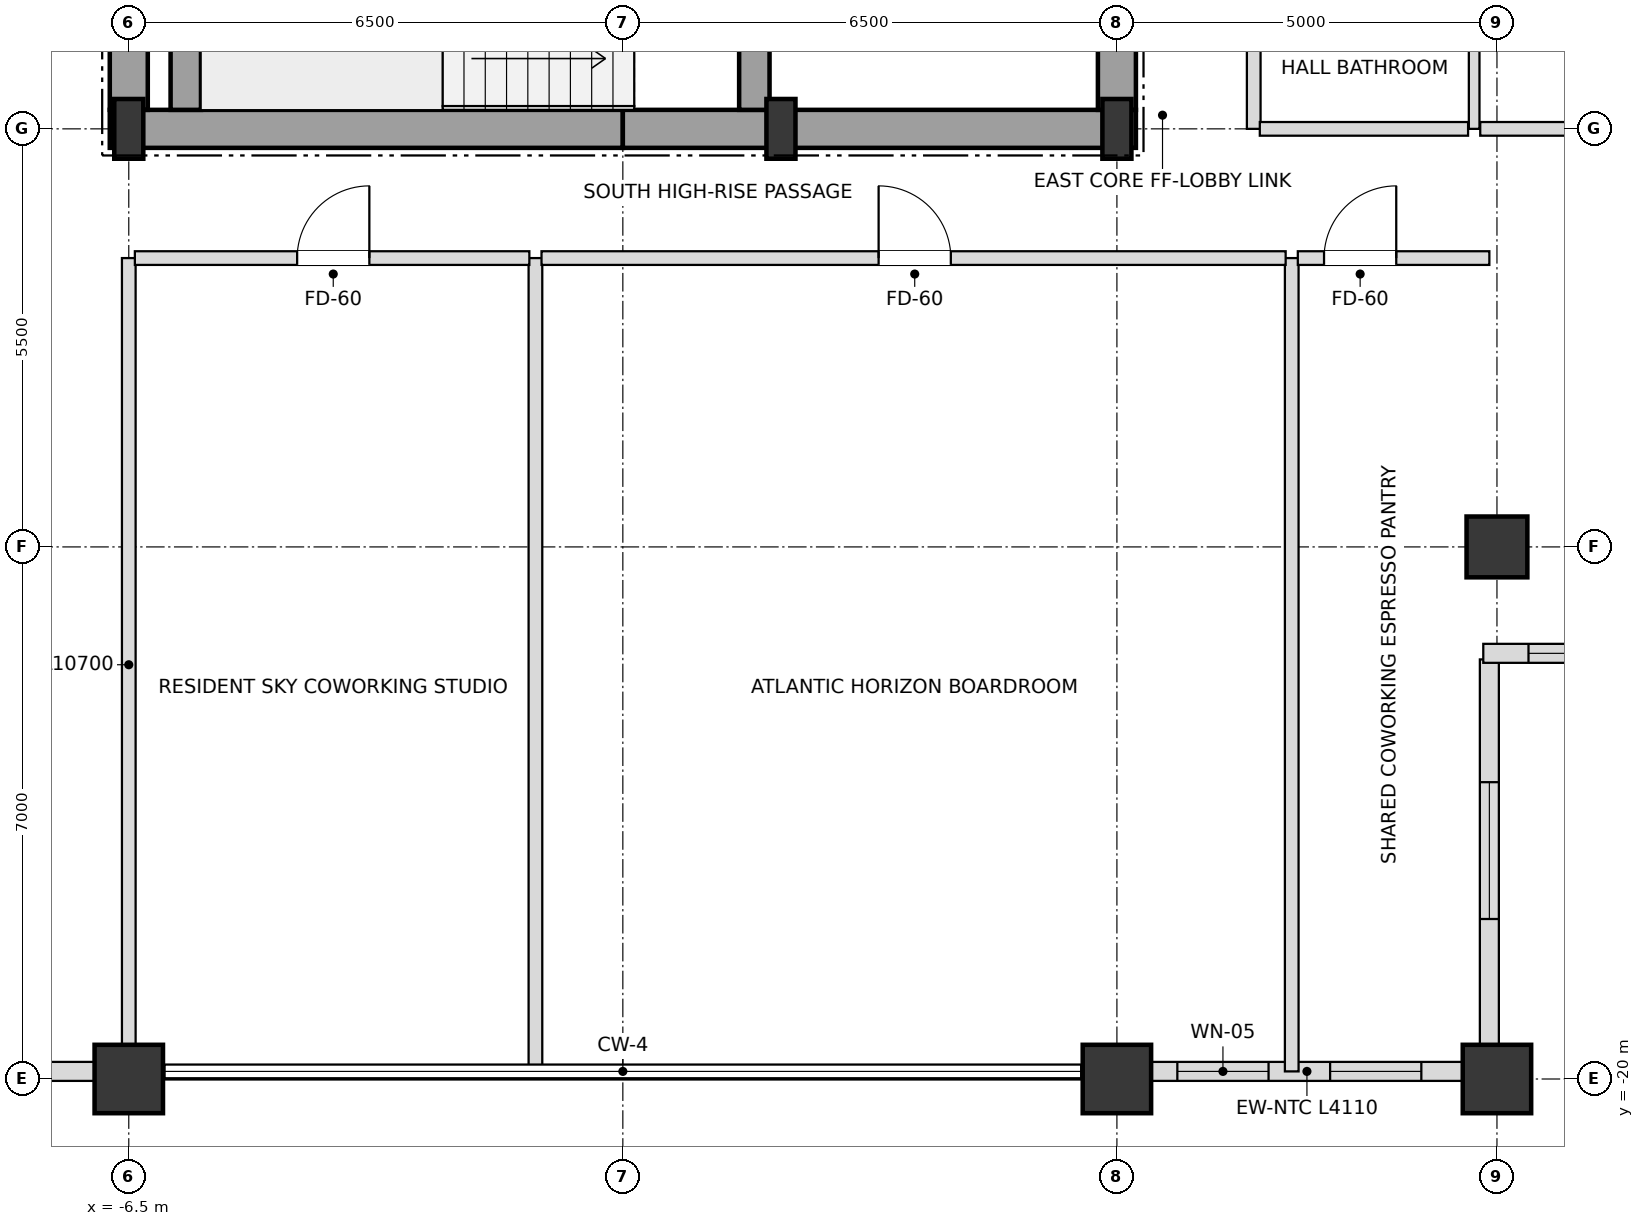
"""IFC4 building model, lengths in metres.
Left out: names, types, materials, properties, quantities, classifications, styles, units other than length and angle.
Written with IfcOpenShell. Run it as: python <this file> out.ifc"""

import sys

from ifc_helpers import new_model, si_unit, direction, frame, frame_2d, origin, origin_2d, place, context, subcontext, project, spatial, rectangle, i_section, extrude, element, fill, save


model = new_model("IFC4")
c1 = context("Model", 3, precision=1e-05, world=origin(), true_north=direction((0.0, 1.0)))
c2 = subcontext(c1, "Body", "Model", "MODEL_VIEW")
j1 = project(units=[si_unit("LENGTHUNIT", "METRE"), si_unit("PLANEANGLEUNIT", "RADIAN")], contexts=[c1])
p1 = place(None, origin())
s1 = spatial("IfcSite", under=j1, at=p1, CompositionType="ELEMENT")
p2 = place(p1, origin())
s2 = spatial("IfcBuilding", under=s1, at=p2, CompositionType="ELEMENT")
p3 = place(p2, frame((0.0, 0.0, 247.5)))
s3 = spatial("IfcBuildingStorey", under=s2, at=p3, CompositionType="ELEMENT", Elevation=247.5)
for number, where, z_axis, x_axis in (
    (1, (-6.5, -7.5, 0.0), (0.0, 0.0, 1.0), (1.0, 0.0, 0.0)),
    (2, (2.08, -7.5, 0.0), (0.0, 0.0, 1.0), (1.0, 0.0, 0.0)),
    (3, (6.5, -7.5, 0.0), (0.0, 0.0, 1.0), (1.0, 0.0, 0.0)),
):
    element("IfcColumn", number, at=place(p3, frame(where, z_axis=z_axis, x_axis=x_axis)), inside=s3, PredefinedType="COLUMN", context=c2, shape_type="SweptSolid", body=[
        extrude(i_section(OverallWidth=0.382, OverallDepth=0.786, WebThickness=0.02, FlangeThickness=0.033, at=origin_2d()), origin(), (0.0, 0.0, 1.0), 3.6),
    ])
for number, where, z_axis, x_axis in (
    (4, (-6.5, -20.0, 0.0), (0.0, 0.0, 1.0), (1.0, 0.0, 0.0)),
    (5, (6.5, -20.0, 0.0), (0.0, 0.0, 1.0), (1.0, 0.0, 0.0)),
    (6, (11.5, -20.0, 0.0), (0.0, 0.0, 1.0), (1.0, 0.0, 0.0)),
):
    element("IfcColumn", number, at=place(p3, frame(where, z_axis=z_axis, x_axis=x_axis)), inside=s3, PredefinedType="USERDEFINED", context=c2, shape_type="SweptSolid", body=[
        extrude(rectangle(XDim=0.9, YDim=0.9, at=origin_2d()), origin(), (0.0, 0.0, 1.0), 3.6),
    ])
p4 = place(p3, frame((11.5, -13.0, 0.0), z_axis=(0.0, 0.0, 1.0), x_axis=(1.0, 0.0, 0.0)))
e7 = element("IfcColumn", 7, at=p4, inside=s3, PredefinedType="COLUMN", context=c2, shape_type="SweptSolid", body=[
    extrude(rectangle(XDim=0.8, YDim=0.8, at=origin_2d()), origin(), (0.0, 0.0, 1.0), 3.6),
])
p5 = place(p3, frame((-11.055, -19.9, 0.0), z_axis=(0.0, 0.0, 1.0), x_axis=(1.0, 0.0, 0.0)))
e8 = element("IfcWall", 8, at=p5, inside=s3, PredefinedType="SOLIDWALL", context=c2, shape_type="SweptSolid", body=[
    extrude(rectangle(XDim=4.11, YDim=0.25, at=frame_2d((2.055, 0.0))), origin(), (0.0, 0.0, 1.0), 2.748),
])
p6 = place(p5, frame((1.155, 0.0, 0.72)))
e9 = element("IfcOpeningElement", 9, at=p6, cuts=e8, PredefinedType="OPENING", context=c2, shape_type="SweptSolid", body=[
    extrude(rectangle(XDim=1.8, YDim=1.68, at=frame_2d((0.9, 0.84))), frame((0.0, 0.135, 0.0), z_axis=(0.0, -1.0, 0.0), x_axis=(1.0, 0.0, 0.0)), (0.0, 0.0, 1.0), 0.27),
])
p7 = place(p3, frame((6.945, -19.9, 0.0), z_axis=(0.0, 0.0, 1.0), x_axis=(1.0, 0.0, 0.0)))
e10 = element("IfcWall", 10, at=p7, inside=s3, PredefinedType="SOLIDWALL", context=c2, shape_type="SweptSolid", body=[
    extrude(rectangle(XDim=4.11, YDim=0.25, at=frame_2d((2.055, 0.0))), origin(), (0.0, 0.0, 1.0), 2.748),
])
p8 = place(p7, frame((0.35, 0.0, 0.72)))
e11 = element("IfcOpeningElement", 11, at=p8, cuts=e10, PredefinedType="OPENING", context=c2, shape_type="SweptSolid", body=[
    extrude(rectangle(XDim=1.2, YDim=1.68, at=frame_2d((0.6, 0.84))), frame((0.0, 0.135, 0.0), z_axis=(0.0, -1.0, 0.0), x_axis=(1.0, 0.0, 0.0)), (0.0, 0.0, 1.0), 0.27),
])
p9 = place(p7, frame((2.36, 0.0, 0.72)))
e12 = element("IfcOpeningElement", 12, at=p9, cuts=e10, PredefinedType="OPENING", context=c2, shape_type="SweptSolid", body=[
    extrude(rectangle(XDim=1.2, YDim=1.68, at=frame_2d((0.6, 0.84))), frame((0.0, 0.135, 0.0), z_axis=(0.0, -1.0, 0.0), x_axis=(1.0, 0.0, 0.0)), (0.0, 0.0, 1.0), 0.27),
])
p10 = place(p3, frame((11.4, -19.82, 0.0), z_axis=(0.0, 0.0, 1.0), x_axis=(0.0, 1.0, 0.0)))
e13 = element("IfcWall", 13, at=p10, inside=s3, PredefinedType="SOLIDWALL", context=c2, shape_type="SweptSolid", body=[
    extrude(rectangle(XDim=5.34, YDim=0.25, at=frame_2d((2.67, 0.0))), origin(), (0.0, 0.0, 1.0), 2.748),
])
p11 = place(p10, frame((1.925, 0.0, 0.72)))
e14 = element("IfcOpeningElement", 14, at=p11, cuts=e13, PredefinedType="OPENING", context=c2, shape_type="SweptSolid", body=[
    extrude(rectangle(XDim=1.8, YDim=1.68, at=frame_2d((0.9, 0.84))), frame((0.0, 0.135, 0.0), z_axis=(0.0, -1.0, 0.0), x_axis=(1.0, 0.0, 0.0)), (0.0, 0.0, 1.0), 0.27),
])
p12 = place(p3, frame((11.32, -14.4, 0.0), z_axis=(0.0, 0.0, 1.0), x_axis=(1.0, 0.0, 0.0)))
e15 = element("IfcWall", 15, at=p12, inside=s3, PredefinedType="SOLIDWALL", context=c2, shape_type="SweptSolid", body=[
    extrude(rectangle(XDim=5.66, YDim=0.25, at=frame_2d((2.83, 0.0))), origin(), (0.0, 0.0, 1.0), 2.748),
])
p13 = place(p12, frame((0.595, 0.0, 0.72)))
e16 = element("IfcOpeningElement", 16, at=p13, cuts=e15, PredefinedType="OPENING", context=c2, shape_type="SweptSolid", body=[
    extrude(rectangle(XDim=1.8, YDim=1.68, at=frame_2d((0.9, 0.84))), frame((0.0, 0.135, 0.0), z_axis=(0.0, -1.0, 0.0), x_axis=(1.0, 0.0, 0.0)), (0.0, 0.0, 1.0), 0.27),
])
p14 = place(p12, frame((3.265, 0.0, 0.72)))
e17 = element("IfcOpeningElement", 17, at=p14, cuts=e15, PredefinedType="OPENING", context=c2, shape_type="SweptSolid", body=[
    extrude(rectangle(XDim=1.8, YDim=1.68, at=frame_2d((0.9, 0.84))), frame((0.0, 0.135, 0.0), z_axis=(0.0, -1.0, 0.0), x_axis=(1.0, 0.0, 0.0)), (0.0, 0.0, 1.0), 0.27),
])
for number, where, z_axis, x_axis in (
    (18, (-6.75, -7.5, 0.0), (0.0, 0.0, 1.0), (1.0, 0.0, 0.0)),
    (19, (0.0, -7.5, 0.0), (0.0, 0.0, 1.0), (1.0, 0.0, 0.0)),
):
    element("IfcWall", number, at=place(p3, frame(where, z_axis=z_axis, x_axis=x_axis)), inside=s3, PredefinedType="SHEAR", context=c2, shape_type="SweptSolid", body=[
        extrude(rectangle(XDim=6.75, YDim=0.5, at=frame_2d((3.375, 0.0))), origin(), (0.0, 0.0, 1.0), 3.38),
    ])
p15 = place(p3, frame((-6.5, -7.25, 0.0), z_axis=(0.0, 0.0, 1.0), x_axis=(0.0, 1.0, 0.0)))
e20 = element("IfcWall", 20, at=p15, inside=s3, PredefinedType="SHEAR", context=c2, shape_type="SweptSolid", body=[
    extrude(rectangle(XDim=3.55, YDim=0.5, at=frame_2d((1.775, 0.0))), origin(), (0.0, 0.0, 1.0), 3.38),
])
p16 = place(p3, frame((6.5, -7.25, 0.0), z_axis=(0.0, 0.0, 1.0), x_axis=(0.0, 1.0, 0.0)))
e21 = element("IfcWall", 21, at=p16, inside=s3, PredefinedType="SHEAR", context=c2, shape_type="SweptSolid", body=[
    extrude(rectangle(XDim=5.75, YDim=0.5, at=frame_2d((2.875, 0.0))), origin(), (0.0, 0.0, 1.0), 3.38),
])
p17 = place(p16, frame((0.85, 0.0, 0.0)))
e22 = element("IfcOpeningElement", 22, at=p17, cuts=e21, PredefinedType="OPENING", context=c2, shape_type="SweptSolid", body=[
    extrude(rectangle(XDim=1.05, YDim=2.15, at=frame_2d((0.525, 1.075))), frame((0.0, 0.26, 0.0), z_axis=(0.0, -1.0, 0.0), x_axis=(1.0, 0.0, 0.0)), (0.0, 0.0, 1.0), 0.52),
])
p18 = place(p3, frame((-5.75, -7.25, 0.0), z_axis=(0.0, 0.0, 1.0), x_axis=(0.0, 1.0, 0.0)))
e23 = element("IfcWall", 23, at=p18, inside=s3, PredefinedType="SHEAR", context=c2, shape_type="SweptSolid", body=[
    extrude(rectangle(XDim=2.9, YDim=0.4, at=frame_2d((1.45, 0.0))), origin(), (0.0, 0.0, 1.0), 3.38),
])
p19 = place(p3, frame((1.73, -7.25, 0.0), z_axis=(0.0, 0.0, 1.0), x_axis=(0.0, 1.0, 0.0)))
e24 = element("IfcWall", 24, at=p19, inside=s3, PredefinedType="SHEAR", context=c2, shape_type="SweptSolid", body=[
    extrude(rectangle(XDim=3.3, YDim=0.4, at=frame_2d((1.65, 0.0))), origin(), (0.0, 0.0, 1.0), 3.38),
])
p20 = place(p19, frame((0.9, 0.0, 0.0)))
e25 = element("IfcOpeningElement", 25, at=p20, cuts=e24, PredefinedType="OPENING", context=c2, shape_type="SweptSolid", body=[
    extrude(rectangle(XDim=1.05, YDim=2.15, at=frame_2d((0.525, 1.075))), frame((0.0, 0.21, 0.0), z_axis=(0.0, -1.0, 0.0), x_axis=(1.0, 0.0, 0.0)), (0.0, 0.0, 1.0), 0.42),
])
p21 = place(p3, frame((-6.5, -19.9, 0.0), z_axis=(0.0, 0.0, 1.0), x_axis=(0.0, 1.0, 0.0)))
e26 = element("IfcWall", 26, at=p21, inside=s3, PredefinedType="PARTITIONING", context=c2, shape_type="SweptSolid", body=[
    extrude(rectangle(XDim=10.7, YDim=0.18, at=frame_2d((5.35, 0.0))), origin(), (0.0, 0.0, 1.0), 2.826),
])
p22 = place(p3, frame((-1.15, -19.9, 0.0), z_axis=(0.0, 0.0, 1.0), x_axis=(0.0, 1.0, 0.0)))
e27 = element("IfcWall", 27, at=p22, inside=s3, PredefinedType="PARTITIONING", context=c2, shape_type="SweptSolid", body=[
    extrude(rectangle(XDim=10.7, YDim=0.18, at=frame_2d((5.35, 0.0))), origin(), (0.0, 0.0, 1.0), 3.018),
])
p23 = place(p3, frame((8.3, -7.5, 0.0), z_axis=(0.0, 0.0, 1.0), x_axis=(0.0, 1.0, 0.0)))
e28 = element("IfcWall", 28, at=p23, inside=s3, PredefinedType="PARTITIONING", context=c2, shape_type="SweptSolid", body=[
    extrude(rectangle(XDim=15.0, YDim=0.18, at=frame_2d((7.5, 0.0))), origin(), (0.0, 0.0, 1.0), 3.38),
])
p24 = place(p23, frame((2.355, 0.0, 0.0)))
e29 = element("IfcOpeningElement", 29, at=p24, cuts=e28, PredefinedType="OPENING", context=c2, shape_type="SweptSolid", body=[
    extrude(rectangle(XDim=0.95, YDim=2.15, at=frame_2d((0.475, 1.075))), frame((0.0, 0.1, 0.0), z_axis=(0.0, -1.0, 0.0), x_axis=(1.0, 0.0, 0.0)), (0.0, 0.0, 1.0), 0.2),
])
p25 = place(p3, frame((8.8, -19.9, 0.0), z_axis=(0.0, 0.0, 1.0), x_axis=(0.0, 1.0, 0.0)))
e30 = element("IfcWall", 30, at=p25, inside=s3, PredefinedType="PARTITIONING", context=c2, shape_type="SweptSolid", body=[
    extrude(rectangle(XDim=10.7, YDim=0.18, at=frame_2d((5.35, 0.0))), origin(), (0.0, 0.0, 1.0), 2.826),
])
p26 = place(p3, frame((11.2, -7.5, 0.0), z_axis=(0.0, 0.0, 1.0), x_axis=(0.0, 1.0, 0.0)))
e31 = element("IfcWall", 31, at=p26, inside=s3, PredefinedType="PARTITIONING", context=c2, shape_type="SweptSolid", body=[
    extrude(rectangle(XDim=15.0, YDim=0.14, at=frame_2d((7.5, 0.0))), origin(), (0.0, 0.0, 1.0), 3.38),
])
p27 = place(p26, frame((3.475, 0.0, 0.0)))
e32 = element("IfcOpeningElement", 32, at=p27, cuts=e31, PredefinedType="OPENING", context=c2, shape_type="SweptSolid", body=[
    extrude(rectangle(XDim=0.95, YDim=2.1, at=frame_2d((0.475, 1.05))), frame((0.0, 0.08, 0.0), z_axis=(0.0, -1.0, 0.0), x_axis=(1.0, 0.0, 0.0)), (0.0, 0.0, 1.0), 0.16),
])
p28 = place(p3, frame((-6.42, -9.2, 0.0), z_axis=(0.0, 0.0, 1.0), x_axis=(1.0, 0.0, 0.0)))
e33 = element("IfcWall", 33, at=p28, inside=s3, PredefinedType="PARTITIONING", context=c2, shape_type="SweptSolid", body=[
    extrude(rectangle(XDim=5.19, YDim=0.18, at=frame_2d((2.595, 0.0))), origin(), (0.0, 0.0, 1.0), 3.38),
])
p29 = place(p28, frame((2.135, 0.0, 0.0)))
e34 = element("IfcOpeningElement", 34, at=p29, cuts=e33, PredefinedType="OPENING", context=c2, shape_type="SweptSolid", body=[
    extrude(rectangle(XDim=0.95, YDim=2.15, at=frame_2d((0.475, 1.075))), frame((0.0, 0.1, 0.0), z_axis=(0.0, -1.0, 0.0), x_axis=(1.0, 0.0, 0.0)), (0.0, 0.0, 1.0), 0.2),
])
p30 = place(p3, frame((-1.07, -9.2, 0.0), z_axis=(0.0, 0.0, 1.0), x_axis=(1.0, 0.0, 0.0)))
e35 = element("IfcWall", 35, at=p30, inside=s3, PredefinedType="PARTITIONING", context=c2, shape_type="SweptSolid", body=[
    extrude(rectangle(XDim=9.79, YDim=0.18, at=frame_2d((4.895, 0.0))), origin(), (0.0, 0.0, 1.0), 2.826),
])
p31 = place(p30, frame((4.435, 0.0, 0.0)))
e36 = element("IfcOpeningElement", 36, at=p31, cuts=e35, PredefinedType="OPENING", context=c2, shape_type="SweptSolid", body=[
    extrude(rectangle(XDim=0.95, YDim=2.15, at=frame_2d((0.475, 1.075))), frame((0.0, 0.1, 0.0), z_axis=(0.0, -1.0, 0.0), x_axis=(1.0, 0.0, 0.0)), (0.0, 0.0, 1.0), 0.2),
])
p32 = place(p3, frame((8.88, -9.2, 0.0), z_axis=(0.0, 0.0, 1.0), x_axis=(1.0, 0.0, 0.0)))
e37 = element("IfcWall", 37, at=p32, inside=s3, PredefinedType="PARTITIONING", context=c2, shape_type="SweptSolid", body=[
    extrude(rectangle(XDim=2.52, YDim=0.18, at=frame_2d((1.26, 0.0))), origin(), (0.0, 0.0, 1.0), 3.38),
])
p33 = place(p32, frame((0.345, 0.0, 0.0)))
e38 = element("IfcOpeningElement", 38, at=p33, cuts=e37, PredefinedType="OPENING", context=c2, shape_type="SweptSolid", body=[
    extrude(rectangle(XDim=0.95, YDim=2.15, at=frame_2d((0.475, 1.075))), frame((0.0, 0.1, 0.0), z_axis=(0.0, -1.0, 0.0), x_axis=(1.0, 0.0, 0.0)), (0.0, 0.0, 1.0), 0.2),
])
p34 = place(p3, frame((8.38, -7.5, 0.0), z_axis=(0.0, 0.0, 1.0), x_axis=(1.0, 0.0, 0.0)))
e39 = element("IfcWall", 39, at=p34, inside=s3, PredefinedType="PARTITIONING", context=c2, shape_type="SweptSolid", body=[
    extrude(rectangle(XDim=2.74, YDim=0.18, at=frame_2d((1.37, 0.0))), origin(), (0.0, 0.0, 1.0), 2.826),
])
p35 = place(p3, frame((11.28, -7.5, 0.0), z_axis=(0.0, 0.0, 1.0), x_axis=(1.0, 0.0, 0.0)))
e40 = element("IfcWall", 40, at=p35, inside=s3, PredefinedType="PARTITIONING", context=c2, shape_type="SweptSolid", body=[
    extrude(rectangle(XDim=5.62, YDim=0.18, at=frame_2d((2.81, 0.0))), origin(), (0.0, 0.0, 1.0), 2.826),
])
p36 = place(p8, origin())
e41 = element("IfcWindow", 41, at=p36, inside=s3, PartitioningType="SINGLE_PANEL", PredefinedType="WINDOW", context=c2, shape_type="SweptSolid", body=[
    extrude(rectangle(XDim=1.2, YDim=1.68, at=frame_2d((0.6, 0.84))), frame((0.0, 0.03, 0.0), z_axis=(0.0, -1.0, 0.0), x_axis=(1.0, 0.0, 0.0)), (0.0, 0.0, 1.0), 0.06),
])
fill(e11, e41)
p37 = place(p9, origin())
e42 = element("IfcWindow", 42, at=p37, inside=s3, PartitioningType="SINGLE_PANEL", PredefinedType="WINDOW", context=c2, shape_type="SweptSolid", body=[
    extrude(rectangle(XDim=1.2, YDim=1.68, at=frame_2d((0.6, 0.84))), frame((0.0, 0.03, 0.0), z_axis=(0.0, -1.0, 0.0), x_axis=(1.0, 0.0, 0.0)), (0.0, 0.0, 1.0), 0.06),
])
fill(e12, e42)
p38 = place(p11, origin())
e43 = element("IfcWindow", 43, at=p38, inside=s3, PartitioningType="SINGLE_PANEL", PredefinedType="WINDOW", context=c2, shape_type="SweptSolid", body=[
    extrude(rectangle(XDim=1.8, YDim=1.68, at=frame_2d((0.9, 0.84))), frame((0.0, 0.03, 0.0), z_axis=(0.0, -1.0, 0.0), x_axis=(1.0, 0.0, 0.0)), (0.0, 0.0, 1.0), 0.06),
])
fill(e14, e43)
p39 = place(p13, origin())
e44 = element("IfcWindow", 44, at=p39, inside=s3, PartitioningType="SINGLE_PANEL", PredefinedType="WINDOW", context=c2, shape_type="SweptSolid", body=[
    extrude(rectangle(XDim=1.8, YDim=1.68, at=frame_2d((0.9, 0.84))), frame((0.0, 0.03, 0.0), z_axis=(0.0, -1.0, 0.0), x_axis=(1.0, 0.0, 0.0)), (0.0, 0.0, 1.0), 0.06),
])
fill(e16, e44)
p40 = place(p29, origin())
e45 = element("IfcDoor", 45, at=p40, inside=s3, OperationType="SINGLE_SWING_RIGHT", PredefinedType="DOOR", context=c2, shape_type="SweptSolid", body=[
    extrude(rectangle(XDim=0.95, YDim=2.15, at=frame_2d((0.475, 1.075))), frame((0.0, 0.025, 0.0), z_axis=(0.0, -1.0, 0.0), x_axis=(1.0, 0.0, 0.0)), (0.0, 0.0, 1.0), 0.05),
])
fill(e34, e45)
p41 = place(p31, origin())
e46 = element("IfcDoor", 46, at=p41, inside=s3, OperationType="SINGLE_SWING_LEFT", PredefinedType="DOOR", context=c2, shape_type="SweptSolid", body=[
    extrude(rectangle(XDim=0.95, YDim=2.15, at=frame_2d((0.475, 1.075))), frame((0.0, 0.025, 0.0), z_axis=(0.0, -1.0, 0.0), x_axis=(1.0, 0.0, 0.0)), (0.0, 0.0, 1.0), 0.05),
])
fill(e36, e46)
p42 = place(p33, origin())
e47 = element("IfcDoor", 47, at=p42, inside=s3, OperationType="SINGLE_SWING_RIGHT", PredefinedType="DOOR", context=c2, shape_type="SweptSolid", body=[
    extrude(rectangle(XDim=0.95, YDim=2.15, at=frame_2d((0.475, 1.075))), frame((0.0, 0.025, 0.0), z_axis=(0.0, -1.0, 0.0), x_axis=(1.0, 0.0, 0.0)), (0.0, 0.0, 1.0), 0.05),
])
fill(e38, e47)
save(model, sys.argv[1])
